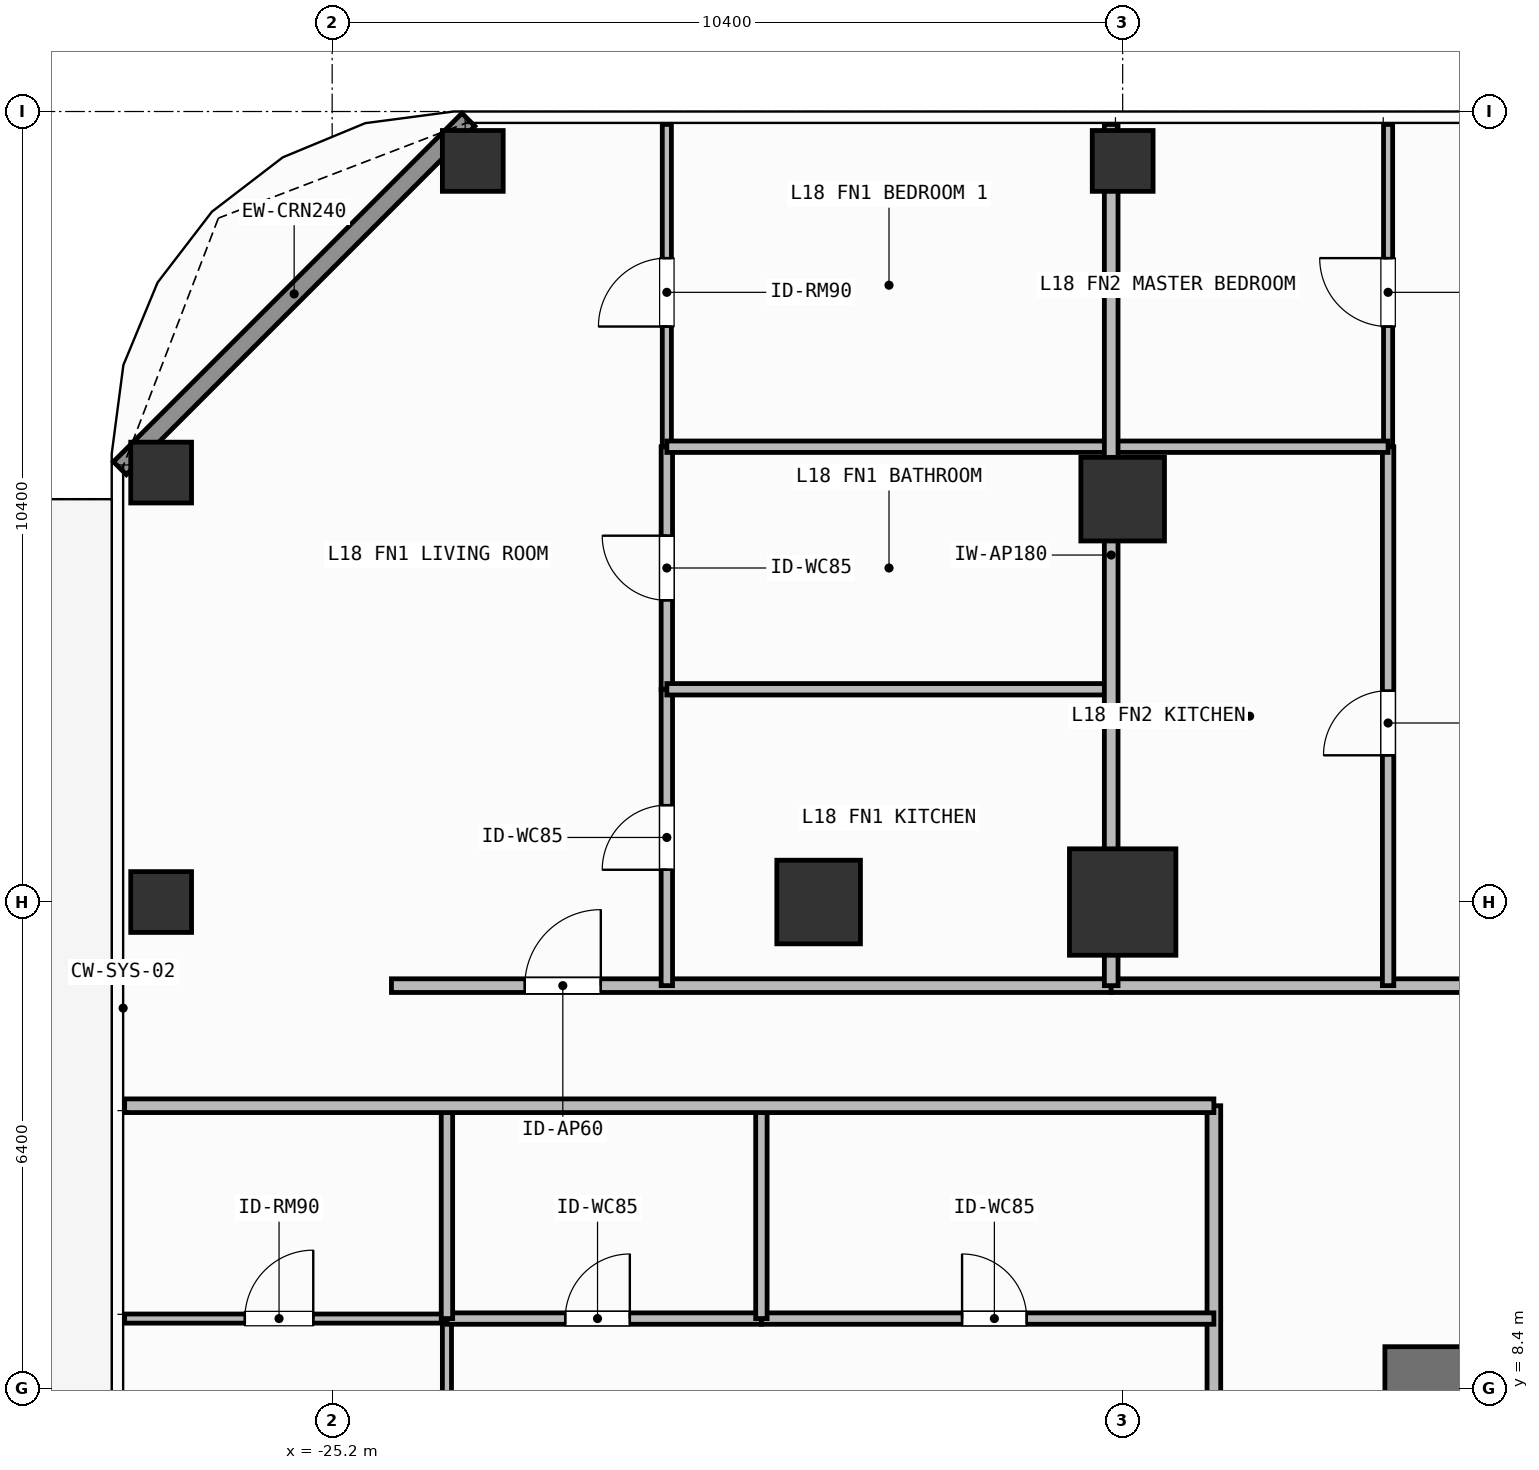
"""IFC4 building model, lengths in metres.
Left out: names, types, materials, properties, quantities, classifications, styles, units other than length and angle.
Written with IfcOpenShell. Run it as: python <this file> out.ifc"""

import sys

from ifc_helpers import new_model, si_unit, direction, frame, frame_2d, origin, origin_2d, place, context, subcontext, project, spatial, rectangle, hollow_rectangle, extrude, element, fill, save


model = new_model("IFC4")
c1 = context("Model", 3, precision=1e-05, world=origin(), true_north=direction((0.0, 1.0)))
c2 = subcontext(c1, "Body", "Model", "MODEL_VIEW")
j1 = project(units=[si_unit("LENGTHUNIT", "METRE"), si_unit("PLANEANGLEUNIT", "RADIAN")], contexts=[c1])
p1 = place(None, origin())
s1 = spatial("IfcSite", under=j1, at=p1, CompositionType="ELEMENT")
p2 = place(p1, origin())
s2 = spatial("IfcBuilding", under=s1, at=p2, CompositionType="ELEMENT")
p3 = place(p2, frame((0.0, 0.0, 69.6)))
s3 = spatial("IfcBuildingStorey", under=s2, at=p3, CompositionType="ELEMENT", Elevation=69.6)
p4 = place(p3, frame((-11.35, 8.4, 0.0), z_axis=(0.0, 0.0, 1.0), x_axis=(1.0, 0.0, 0.0)))
e1 = element("IfcWall", 1, at=p4, inside=s3, PredefinedType="SHEAR", context=c2, shape_type="SweptSolid", body=[
    extrude(rectangle(XDim=1.65, YDim=1.1, at=frame_2d((0.825, 0.0))), origin(), (0.0, 0.0, 1.0), 3.9),
])
p5 = place(p3, frame((-14.8, 14.8, 0.0), z_axis=(0.0, 0.0, 1.0), x_axis=(1.0, 0.0, 0.0)))
e2 = element("IfcColumn", 2, at=p5, inside=s3, PredefinedType="COLUMN", context=c2, shape_type="SweptSolid", body=[
    extrude(rectangle(XDim=1.4, YDim=1.4, at=origin_2d()), origin(), (0.0, 0.0, 1.0), 3.9),
])
for number, where, z_axis, x_axis in (
    (3, (-18.8, 14.8, 0.0), (0.0, 0.0, 1.0), (1.0, 0.0, 0.0)),
    (4, (-14.8, 20.1, 0.0), (0.0, 0.0, 1.0), (1.0, 0.0, 0.0)),
):
    element("IfcColumn", number, at=place(p3, frame(where, z_axis=z_axis, x_axis=x_axis)), inside=s3, PredefinedType="COLUMN", context=c2, shape_type="SweptSolid", body=[
        extrude(rectangle(XDim=1.1, YDim=1.1, at=origin_2d()), origin(), (0.0, 0.0, 1.0), 3.9),
    ])
for number, where, z_axis, x_axis in (
    (5, (-23.35, 24.55, 0.0), (0.0, 0.0, 1.0), (1.0, 0.0, 0.0)),
    (6, (-27.45, 20.45, 0.0), (0.0, 0.0, 1.0), (1.0, 0.0, 0.0)),
    (7, (-14.8, 24.55, 0.0), (0.0, 0.0, 1.0), (1.0, 0.0, 0.0)),
    (8, (-27.45, 14.8, 0.0), (0.0, 0.0, 1.0), (1.0, 0.0, 0.0)),
):
    element("IfcColumn", number, at=place(p3, frame(where, z_axis=z_axis, x_axis=x_axis)), inside=s3, PredefinedType="COLUMN", context=c2, shape_type="SweptSolid", body=[
        extrude(hollow_rectangle(XDim=0.8, YDim=0.8, WallThickness=0.036, at=origin_2d()), origin(), (0.0, 0.0, 1.0), 3.9),
    ])
p6 = place(p3, frame((-27.992, 20.508, 0.0), z_axis=(0.0, 0.0, 1.0), x_axis=(0.707106781187, 0.707106781187, 0.0)))
e9 = element("IfcWall", 9, at=p6, inside=s3, PredefinedType="SOLIDWALL", context=c2, shape_type="SweptSolid", body=[
    extrude(rectangle(XDim=6.484, YDim=0.24, at=frame_2d((3.242, 0.0))), origin(), (0.0, 0.0, 1.0), 3.68),
])
p7 = place(p3, frame((-24.42, 13.7, 0.0), z_axis=(0.0, 0.0, 1.0), x_axis=(1.0, 0.0, 0.0)))
e10 = element("IfcWall", 10, at=p7, inside=s3, PredefinedType="PARTITIONING", context=c2, shape_type="SweptSolid", body=[
    extrude(rectangle(XDim=9.469, YDim=0.18, at=frame_2d((4.734, 0.0))), origin(), (0.0, 0.0, 1.0), 3.68),
])
p8 = place(p7, frame((1.754, 0.0, 0.0)))
e11 = element("IfcOpeningElement", 11, at=p8, cuts=e10, PredefinedType="OPENING", context=c2, shape_type="SweptSolid", body=[
    extrude(rectangle(XDim=1.0, YDim=2.2, at=frame_2d((0.5, 1.1))), frame((0.0, 0.1, 0.0), z_axis=(0.0, -1.0, 0.0), x_axis=(1.0, 0.0, 0.0)), (0.0, 0.0, 1.0), 0.2),
])
p9 = place(p3, frame((-20.797, 13.7, 0.0), z_axis=(0.0, 0.0, 1.0), x_axis=(0.0, 1.0, 0.0)))
e12 = element("IfcWall", 12, at=p9, inside=s3, PredefinedType="PARTITIONING", context=c2, shape_type="SweptSolid", body=[
    extrude(rectangle(XDim=3.899, YDim=0.15, at=frame_2d((1.95, 0.0))), origin(), (0.0, 0.0, 1.0), 3.68),
])
p10 = place(p9, frame((1.524, 0.0, 0.0)))
e13 = element("IfcOpeningElement", 13, at=p10, cuts=e12, PredefinedType="OPENING", context=c2, shape_type="SweptSolid", body=[
    extrude(rectangle(XDim=0.85, YDim=2.1, at=frame_2d((0.425, 1.05))), frame((0.0, 0.085, 0.0), z_axis=(0.0, -1.0, 0.0), x_axis=(1.0, 0.0, 0.0)), (0.0, 0.0, 1.0), 0.17),
])
p11 = place(p3, frame((-20.797, 17.599, 0.0), z_axis=(0.0, 0.0, 1.0), x_axis=(0.0, 1.0, 0.0)))
e14 = element("IfcWall", 14, at=p11, inside=s3, PredefinedType="PARTITIONING", context=c2, shape_type="SweptSolid", body=[
    extrude(rectangle(XDim=3.191, YDim=0.15, at=frame_2d((1.595, 0.0))), origin(), (0.0, 0.0, 1.0), 3.68),
])
p12 = place(p11, frame((1.17, 0.0, 0.0)))
e15 = element("IfcOpeningElement", 15, at=p12, cuts=e14, PredefinedType="OPENING", context=c2, shape_type="SweptSolid", body=[
    extrude(rectangle(XDim=0.85, YDim=2.1, at=frame_2d((0.425, 1.05))), frame((0.0, 0.085, 0.0), z_axis=(0.0, -1.0, 0.0), x_axis=(1.0, 0.0, 0.0)), (0.0, 0.0, 1.0), 0.17),
])
p13 = place(p3, frame((-20.797, 20.79, 0.0), z_axis=(0.0, 0.0, 1.0), x_axis=(0.0, 1.0, 0.0)))
e16 = element("IfcWall", 16, at=p13, inside=s3, PredefinedType="PARTITIONING", context=c2, shape_type="SweptSolid", body=[
    extrude(rectangle(XDim=4.24, YDim=0.12, at=frame_2d((2.12, 0.0))), origin(), (0.0, 0.0, 1.0), 3.68),
])
p14 = place(p13, frame((1.581, 0.0, 0.0)))
e17 = element("IfcOpeningElement", 17, at=p14, cuts=e16, PredefinedType="OPENING", context=c2, shape_type="SweptSolid", body=[
    extrude(rectangle(XDim=0.9, YDim=2.1, at=frame_2d((0.45, 1.05))), frame((0.0, 0.07, 0.0), z_axis=(0.0, -1.0, 0.0), x_axis=(1.0, 0.0, 0.0)), (0.0, 0.0, 1.0), 0.14),
])
p15 = place(p3, frame((-14.951, 13.7, 0.0), z_axis=(0.0, 0.0, 1.0), x_axis=(1.0, 0.0, 0.0)))
e18 = element("IfcWall", 18, at=p15, inside=s3, PredefinedType="PARTITIONING", context=c2, shape_type="SweptSolid", body=[
    extrude(rectangle(XDim=12.051, YDim=0.18, at=frame_2d((6.025, 0.0))), origin(), (0.0, 0.0, 1.0), 3.68),
])
p16 = place(p15, frame((5.704, 0.0, 0.0)))
e19 = element("IfcOpeningElement", 19, at=p16, cuts=e18, PredefinedType="OPENING", context=c2, shape_type="SweptSolid", body=[
    extrude(rectangle(XDim=1.0, YDim=2.2, at=frame_2d((0.5, 1.1))), frame((0.0, 0.1, 0.0), z_axis=(0.0, -1.0, 0.0), x_axis=(1.0, 0.0, 0.0)), (0.0, 0.0, 1.0), 0.2),
])
p17 = place(p3, frame((-11.308, 13.7, 0.0), z_axis=(0.0, 0.0, 1.0), x_axis=(0.0, 1.0, 0.0)))
e20 = element("IfcWall", 20, at=p17, inside=s3, PredefinedType="PARTITIONING", context=c2, shape_type="SweptSolid", body=[
    extrude(rectangle(XDim=7.09, YDim=0.15, at=frame_2d((3.545, 0.0))), origin(), (0.0, 0.0, 1.0), 3.37),
])
p18 = place(p17, frame((3.03, 0.0, 0.0)))
e21 = element("IfcOpeningElement", 21, at=p18, cuts=e20, PredefinedType="OPENING", context=c2, shape_type="SweptSolid", body=[
    extrude(rectangle(XDim=0.85, YDim=2.1, at=frame_2d((0.425, 1.05))), frame((0.0, 0.085, 0.0), z_axis=(0.0, -1.0, 0.0), x_axis=(1.0, 0.0, 0.0)), (0.0, 0.0, 1.0), 0.17),
])
p19 = place(p3, frame((-11.308, 20.79, 0.0), z_axis=(0.0, 0.0, 1.0), x_axis=(0.0, 1.0, 0.0)))
e22 = element("IfcWall", 22, at=p19, inside=s3, PredefinedType="PARTITIONING", context=c2, shape_type="SweptSolid", body=[
    extrude(rectangle(XDim=4.24, YDim=0.12, at=frame_2d((2.12, 0.0))), origin(), (0.0, 0.0, 1.0), 3.37),
])
p20 = place(p19, frame((1.581, 0.0, 0.0)))
e23 = element("IfcOpeningElement", 23, at=p20, cuts=e22, PredefinedType="OPENING", context=c2, shape_type="SweptSolid", body=[
    extrude(rectangle(XDim=0.9, YDim=2.1, at=frame_2d((0.45, 1.05))), frame((0.0, 0.07, 0.0), z_axis=(0.0, -1.0, 0.0), x_axis=(1.0, 0.0, 0.0)), (0.0, 0.0, 1.0), 0.14),
])
p21 = place(p3, frame((-13.6, -0.873, 0.0), z_axis=(0.0, 0.0, 1.0), x_axis=(0.0, 1.0, 0.0)))
e24 = element("IfcWall", 24, at=p21, inside=s3, PredefinedType="PARTITIONING", context=c2, shape_type="SweptSolid", body=[
    extrude(rectangle(XDim=12.993, YDim=0.18, at=frame_2d((6.497, 0.0))), origin(), (0.0, 0.0, 1.0), 3.68),
])
p22 = place(p21, frame((6.446, 0.0, 0.0)))
e25 = element("IfcOpeningElement", 25, at=p22, cuts=e24, PredefinedType="OPENING", context=c2, shape_type="SweptSolid", body=[
    extrude(rectangle(XDim=1.0, YDim=2.2, at=frame_2d((0.5, 1.1))), frame((0.0, 0.1, 0.0), z_axis=(0.0, -1.0, 0.0), x_axis=(1.0, 0.0, 0.0)), (0.0, 0.0, 1.0), 0.2),
])
p23 = place(p3, frame((-23.69, 3.097, 0.0), z_axis=(0.0, 0.0, 1.0), x_axis=(0.0, 1.0, 0.0)))
e26 = element("IfcWall", 26, at=p23, inside=s3, PredefinedType="PARTITIONING", context=c2, shape_type="SweptSolid", body=[
    extrude(rectangle(XDim=6.223, YDim=0.12, at=frame_2d((3.112, 0.0))), origin(), (0.0, 0.0, 1.0), 3.68),
])
p24 = place(p23, frame((2.662, 0.0, 0.0)))
e27 = element("IfcOpeningElement", 27, at=p24, cuts=e26, PredefinedType="OPENING", context=c2, shape_type="SweptSolid", body=[
    extrude(rectangle(XDim=0.9, YDim=2.1, at=frame_2d((0.45, 1.05))), frame((0.0, 0.07, 0.0), z_axis=(0.0, -1.0, 0.0), x_axis=(1.0, 0.0, 0.0)), (0.0, 0.0, 1.0), 0.14),
])
p25 = place(p3, frame((-23.69, 9.32, 0.0), z_axis=(0.0, 0.0, 1.0), x_axis=(1.0, 0.0, 0.0)))
e28 = element("IfcWall", 28, at=p25, inside=s3, PredefinedType="PARTITIONING", context=c2, shape_type="SweptSolid", body=[
    extrude(rectangle(XDim=4.137, YDim=0.15, at=frame_2d((2.068, 0.0))), origin(), (0.0, 0.0, 1.0), 3.68),
])
p26 = place(p25, frame((1.556, 0.0, 0.0)))
e29 = element("IfcOpeningElement", 29, at=p26, cuts=e28, PredefinedType="OPENING", context=c2, shape_type="SweptSolid", body=[
    extrude(rectangle(XDim=0.85, YDim=2.1, at=frame_2d((0.425, 1.05))), frame((0.0, 0.085, 0.0), z_axis=(0.0, -1.0, 0.0), x_axis=(1.0, 0.0, 0.0)), (0.0, 0.0, 1.0), 0.17),
])
p27 = place(p3, frame((-19.553, 9.32, 0.0), z_axis=(0.0, 0.0, 1.0), x_axis=(1.0, 0.0, 0.0)))
e30 = element("IfcWall", 30, at=p27, inside=s3, PredefinedType="PARTITIONING", context=c2, shape_type="SweptSolid", body=[
    extrude(rectangle(XDim=5.953, YDim=0.15, at=frame_2d((2.977, 0.0))), origin(), (0.0, 0.0, 1.0), 3.68),
])
p28 = place(p27, frame((2.64, 0.0, 0.0)))
e31 = element("IfcOpeningElement", 31, at=p28, cuts=e30, PredefinedType="OPENING", context=c2, shape_type="SweptSolid", body=[
    extrude(rectangle(XDim=0.85, YDim=2.1, at=frame_2d((0.425, 1.05))), frame((0.0, 0.085, 0.0), z_axis=(0.0, -1.0, 0.0), x_axis=(1.0, 0.0, 0.0)), (0.0, 0.0, 1.0), 0.17),
])
p29 = place(p3, frame((-27.93, 9.32, 0.0), z_axis=(0.0, 0.0, 1.0), x_axis=(1.0, 0.0, 0.0)))
e32 = element("IfcWall", 32, at=p29, inside=s3, PredefinedType="PARTITIONING", context=c2, shape_type="SweptSolid", body=[
    extrude(rectangle(XDim=4.24, YDim=0.12, at=frame_2d((2.12, 0.0))), origin(), (0.0, 0.0, 1.0), 3.68),
])
p30 = place(p29, frame((1.581, 0.0, 0.0)))
e33 = element("IfcOpeningElement", 33, at=p30, cuts=e32, PredefinedType="OPENING", context=c2, shape_type="SweptSolid", body=[
    extrude(rectangle(XDim=0.9, YDim=2.1, at=frame_2d((0.45, 1.05))), frame((0.0, 0.07, 0.0), z_axis=(0.0, -1.0, 0.0), x_axis=(1.0, 0.0, 0.0)), (0.0, 0.0, 1.0), 0.14),
])
for number, where, z_axis, x_axis in (
    (34, (-20.797, 17.599, 0.0), (0.0, 0.0, 1.0), (1.0, 0.0, 0.0)),
    (35, (-20.797, 20.79, 0.0), (0.0, 0.0, 1.0), (1.0, 0.0, 0.0)),
):
    element("IfcWall", number, at=place(p3, frame(where, z_axis=z_axis, x_axis=x_axis)), inside=s3, PredefinedType="PARTITIONING", context=c2, shape_type="SweptSolid", body=[
        extrude(rectangle(XDim=5.846, YDim=0.15, at=frame_2d((2.923, 0.0))), origin(), (0.0, 0.0, 1.0), 3.68),
    ])
p31 = place(p3, frame((-14.951, 20.79, 0.0), z_axis=(0.0, 0.0, 1.0), x_axis=(1.0, 0.0, 0.0)))
e36 = element("IfcWall", 36, at=p31, inside=s3, PredefinedType="PARTITIONING", context=c2, shape_type="SweptSolid", body=[
    extrude(rectangle(XDim=3.643, YDim=0.15, at=frame_2d((1.821, 0.0))), origin(), (0.0, 0.0, 1.0), 3.68),
])
p32 = place(p3, frame((-14.951, 13.7, 0.0), z_axis=(0.0, 0.0, 1.0), x_axis=(0.0, 1.0, 0.0)))
e37 = element("IfcWall", 37, at=p32, inside=s3, PredefinedType="PARTITIONING", context=c2, shape_type="SweptSolid", body=[
    extrude(rectangle(XDim=11.33, YDim=0.18, at=frame_2d((5.665, 0.0))), origin(), (0.0, 0.0, 1.0), 3.082),
])
for number, where, z_axis, x_axis in (
    (38, (-19.553, 9.32, 0.0), (0.0, 0.0, 1.0), (0.0, 1.0, 0.0)),
    (39, (-23.69, 9.32, 0.0), (0.0, 0.0, 1.0), (0.0, 1.0, 0.0)),
):
    element("IfcWall", number, at=place(p3, frame(where, z_axis=z_axis, x_axis=x_axis)), inside=s3, PredefinedType="PARTITIONING", context=c2, shape_type="SweptSolid", body=[
        extrude(rectangle(XDim=2.8, YDim=0.15, at=frame_2d((1.4, 0.0))), origin(), (0.0, 0.0, 1.0), 3.68),
    ])
p33 = place(p3, frame((-27.93, 12.12, 0.0), z_axis=(0.0, 0.0, 1.0), x_axis=(1.0, 0.0, 0.0)))
e40 = element("IfcWall", 40, at=p33, inside=s3, PredefinedType="PARTITIONING", context=c2, shape_type="SweptSolid", body=[
    extrude(rectangle(XDim=14.33, YDim=0.18, at=frame_2d((7.165, 0.0))), origin(), (0.0, 0.0, 1.0), 3.68),
])
p34 = place(p8, origin())
e41 = element("IfcDoor", 41, at=p34, inside=s3, OperationType="SINGLE_SWING_RIGHT", PredefinedType="DOOR", context=c2, shape_type="SweptSolid", body=[
    extrude(rectangle(XDim=1.0, YDim=2.2, at=frame_2d((0.5, 1.1))), frame((0.0, 0.025, 0.0), z_axis=(0.0, -1.0, 0.0), x_axis=(1.0, 0.0, 0.0)), (0.0, 0.0, 1.0), 0.05),
])
fill(e11, e41)
p35 = place(p10, origin())
e42 = element("IfcDoor", 42, at=p35, inside=s3, OperationType="SINGLE_SWING_LEFT", PredefinedType="DOOR", context=c2, shape_type="SweptSolid", body=[
    extrude(rectangle(XDim=0.85, YDim=2.1, at=frame_2d((0.425, 1.05))), frame((0.0, 0.025, 0.0), z_axis=(0.0, -1.0, 0.0), x_axis=(1.0, 0.0, 0.0)), (0.0, 0.0, 1.0), 0.05),
])
fill(e13, e42)
p36 = place(p12, origin())
e43 = element("IfcDoor", 43, at=p36, inside=s3, OperationType="SINGLE_SWING_RIGHT", PredefinedType="DOOR", context=c2, shape_type="SweptSolid", body=[
    extrude(rectangle(XDim=0.85, YDim=2.1, at=frame_2d((0.425, 1.05))), frame((0.0, 0.025, 0.0), z_axis=(0.0, -1.0, 0.0), x_axis=(1.0, 0.0, 0.0)), (0.0, 0.0, 1.0), 0.05),
])
fill(e15, e43)
p37 = place(p14, origin())
e44 = element("IfcDoor", 44, at=p37, inside=s3, OperationType="SINGLE_SWING_LEFT", PredefinedType="DOOR", context=c2, shape_type="SweptSolid", body=[
    extrude(rectangle(XDim=0.9, YDim=2.1, at=frame_2d((0.45, 1.05))), frame((0.0, 0.025, 0.0), z_axis=(0.0, -1.0, 0.0), x_axis=(1.0, 0.0, 0.0)), (0.0, 0.0, 1.0), 0.05),
])
fill(e17, e44)
p38 = place(p18, origin())
e45 = element("IfcDoor", 45, at=p38, inside=s3, OperationType="SINGLE_SWING_LEFT", PredefinedType="DOOR", context=c2, shape_type="SweptSolid", body=[
    extrude(rectangle(XDim=0.85, YDim=2.1, at=frame_2d((0.425, 1.05))), frame((0.0, 0.025, 0.0), z_axis=(0.0, -1.0, 0.0), x_axis=(1.0, 0.0, 0.0)), (0.0, 0.0, 1.0), 0.05),
])
fill(e21, e45)
p39 = place(p20, origin())
e46 = element("IfcDoor", 46, at=p39, inside=s3, OperationType="SINGLE_SWING_RIGHT", PredefinedType="DOOR", context=c2, shape_type="SweptSolid", body=[
    extrude(rectangle(XDim=0.9, YDim=2.1, at=frame_2d((0.45, 1.05))), frame((0.0, 0.025, 0.0), z_axis=(0.0, -1.0, 0.0), x_axis=(1.0, 0.0, 0.0)), (0.0, 0.0, 1.0), 0.05),
])
fill(e23, e46)
p40 = place(p26, origin())
e47 = element("IfcDoor", 47, at=p40, inside=s3, OperationType="SINGLE_SWING_RIGHT", PredefinedType="DOOR", context=c2, shape_type="SweptSolid", body=[
    extrude(rectangle(XDim=0.85, YDim=2.1, at=frame_2d((0.425, 1.05))), frame((0.0, 0.025, 0.0), z_axis=(0.0, -1.0, 0.0), x_axis=(1.0, 0.0, 0.0)), (0.0, 0.0, 1.0), 0.05),
])
fill(e29, e47)
p41 = place(p28, origin())
e48 = element("IfcDoor", 48, at=p41, inside=s3, OperationType="SINGLE_SWING_LEFT", PredefinedType="DOOR", context=c2, shape_type="SweptSolid", body=[
    extrude(rectangle(XDim=0.85, YDim=2.1, at=frame_2d((0.425, 1.05))), frame((0.0, 0.025, 0.0), z_axis=(0.0, -1.0, 0.0), x_axis=(1.0, 0.0, 0.0)), (0.0, 0.0, 1.0), 0.05),
])
fill(e31, e48)
p42 = place(p30, origin())
e49 = element("IfcDoor", 49, at=p42, inside=s3, OperationType="SINGLE_SWING_RIGHT", PredefinedType="DOOR", context=c2, shape_type="SweptSolid", body=[
    extrude(rectangle(XDim=0.9, YDim=2.1, at=frame_2d((0.45, 1.05))), frame((0.0, 0.025, 0.0), z_axis=(0.0, -1.0, 0.0), x_axis=(1.0, 0.0, 0.0)), (0.0, 0.0, 1.0), 0.05),
])
fill(e33, e49)
save(model, sys.argv[1])
